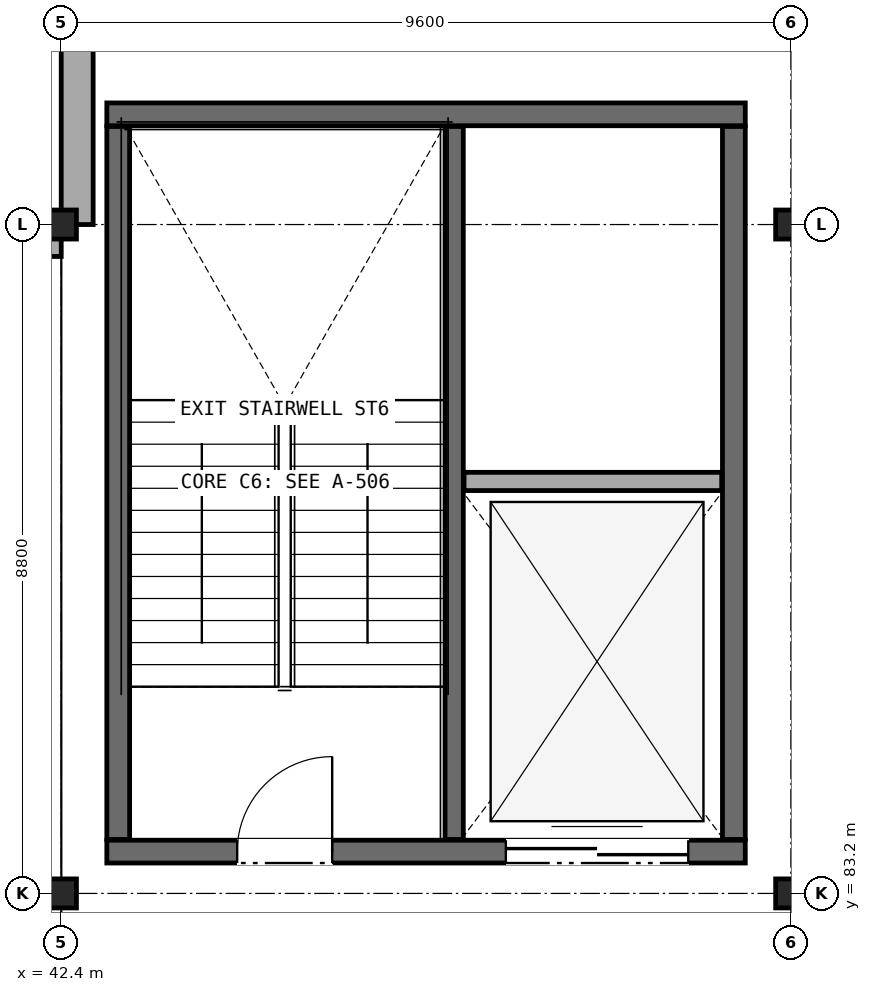
"""IFC4 building model, lengths in metres.
Left out: names, types, materials, properties, quantities, classifications, styles, units other than length and angle.
Written with IfcOpenShell. Run it as: python <this file> out.ifc"""

import sys

from ifc_helpers import new_model, si_unit, direction, frame, frame_2d, origin, origin_2d, place, context, subcontext, project, spatial, rectangle, i_section, extrude, element, fill, save


model = new_model("IFC4")
c1 = context("Model", 3, precision=1e-05, world=origin(), true_north=direction((0.0, 1.0)))
c2 = subcontext(c1, "Body", "Model", "MODEL_VIEW")
j1 = project(units=[si_unit("LENGTHUNIT", "METRE"), si_unit("PLANEANGLEUNIT", "RADIAN")], contexts=[c1])
p1 = place(None, origin())
s1 = spatial("IfcSite", under=j1, at=p1, CompositionType="ELEMENT")
p2 = place(p1, origin())
s2 = spatial("IfcBuilding", under=s1, at=p2, CompositionType="ELEMENT")
p3 = place(p2, frame((0.0, 0.0, 5.6)))
s3 = spatial("IfcBuildingStorey", under=s2, at=p3, CompositionType="ELEMENT", Elevation=5.6)
for number, where, z_axis, x_axis in (
    (1, (42.4, 83.2, 0.0), (0.0, 0.0, 1.0), (1.0, 0.0, 0.0)),
    (2, (42.4, 92.0, 0.0), (0.0, 0.0, 1.0), (1.0, 0.0, 0.0)),
    (3, (52.0, 83.2, 0.0), (0.0, 0.0, 1.0), (1.0, 0.0, 0.0)),
    (4, (52.0, 92.0, 0.0), (0.0, 0.0, 1.0), (1.0, 0.0, 0.0)),
):
    element("IfcColumn", number, at=place(p3, frame(where, z_axis=z_axis, x_axis=x_axis)), inside=s3, PredefinedType="COLUMN", context=c2, shape_type="SweptSolid", body=[
        extrude(i_section(OverallWidth=0.4, OverallDepth=0.382, WebThickness=0.025, FlangeThickness=0.036, at=origin_2d()), origin(), (0.0, 0.0, 1.0), 4.5),
    ])
p4 = place(p3, frame((42.61, 114.984, 0.0), z_axis=(0.0, 0.0, 1.0), x_axis=(0.0, -1.0, 0.0)))
e5 = element("IfcWall", 5, at=p4, inside=s3, PredefinedType="SOLIDWALL", context=c2, shape_type="SweptSolid", body=[
    extrude(rectangle(XDim=22.984, YDim=0.42, at=frame_2d((11.492, 0.0))), origin(), (0.0, 0.0, 1.0), 3.558),
])
p5 = place(p4, frame((1.8, 0.0, 0.75)))
e6 = element("IfcOpeningElement", 6, at=p5, cuts=e5, PredefinedType="OPENING", context=c2, shape_type="SweptSolid", body=[
    extrude(rectangle(XDim=1.4, YDim=2.5, at=frame_2d((0.7, 1.25))), frame((0.0, 0.22, 0.0), z_axis=(0.0, -1.0, 0.0), x_axis=(1.0, 0.0, 0.0)), (0.0, 0.0, 1.0), 0.44),
])
p6 = place(p4, frame((11.0, 0.0, 0.75)))
e7 = element("IfcOpeningElement", 7, at=p6, cuts=e5, PredefinedType="OPENING", context=c2, shape_type="SweptSolid", body=[
    extrude(rectangle(XDim=1.55, YDim=2.5, at=frame_2d((0.775, 1.25))), frame((0.0, 0.22, 0.0), z_axis=(0.0, -1.0, 0.0), x_axis=(1.0, 0.0, 0.0)), (0.0, 0.0, 1.0), 0.44),
])
p7 = place(p4, frame((15.6, 0.0, 0.75)))
e8 = element("IfcOpeningElement", 8, at=p7, cuts=e5, PredefinedType="OPENING", context=c2, shape_type="SweptSolid", body=[
    extrude(rectangle(XDim=1.7, YDim=2.5, at=frame_2d((0.85, 1.25))), frame((0.0, 0.22, 0.0), z_axis=(0.0, -1.0, 0.0), x_axis=(1.0, 0.0, 0.0)), (0.0, 0.0, 1.0), 0.44),
])
p8 = place(p3, frame((42.4, 91.79, 0.0), z_axis=(0.0, 0.0, 1.0), x_axis=(-1.0, 0.0, 0.0)))
e9 = element("IfcWall", 9, at=p8, inside=s3, PredefinedType="SOLIDWALL", context=c2, shape_type="SweptSolid", body=[
    extrude(rectangle(XDim=1.6, YDim=0.42, at=frame_2d((0.8, 0.0))), origin(), (0.0, 0.0, 1.0), 3.598),
])
p9 = place(p3, frame((43.0, 83.75, 0.0), z_axis=(0.0, 0.0, 1.0), x_axis=(1.0, 0.0, 0.0)))
e10 = element("IfcWall", 10, at=p9, inside=s3, PredefinedType="SHEAR", context=c2, shape_type="SweptSolid", body=[
    extrude(rectangle(XDim=8.4, YDim=0.3, at=frame_2d((4.2, 0.0))), origin(), (0.0, 0.0, 1.0), 4.175),
])
p10 = place(p9, frame((1.715, 0.0, 0.0)))
e11 = element("IfcOpeningElement", 11, at=p10, cuts=e10, PredefinedType="OPENING", context=c2, shape_type="SweptSolid", body=[
    extrude(rectangle(XDim=1.25, YDim=2.2, at=frame_2d((0.625, 1.1))), frame((0.0, 0.16, 0.0), z_axis=(0.0, -1.0, 0.0), x_axis=(1.0, 0.0, 0.0)), (0.0, 0.0, 1.0), 0.32),
])
p11 = place(p9, frame((5.25, 0.0, 0.0)))
e12 = element("IfcOpeningElement", 12, at=p11, cuts=e10, PredefinedType="OPENING", context=c2, shape_type="SweptSolid", body=[
    extrude(rectangle(XDim=2.4, YDim=2.55, at=frame_2d((1.2, 1.275))), frame((0.0, 0.16, 0.0), z_axis=(0.0, -1.0, 0.0), x_axis=(1.0, 0.0, 0.0)), (0.0, 0.0, 1.0), 0.32),
])
p12 = place(p3, frame((51.4, 93.45, 0.0), z_axis=(0.0, 0.0, 1.0), x_axis=(-1.0, 0.0, 0.0)))
e13 = element("IfcWall", 13, at=p12, inside=s3, PredefinedType="SHEAR", context=c2, shape_type="SweptSolid", body=[
    extrude(rectangle(XDim=8.4, YDim=0.3, at=frame_2d((4.2, 0.0))), origin(), (0.0, 0.0, 1.0), 4.175),
])
for number, where, z_axis, x_axis in (
    (14, (51.25, 83.91, 0.0), (0.0, 0.0, 1.0), (0.0, 1.0, 0.0)),
    (15, (43.15, 93.29, 0.0), (0.0, 0.0, 1.0), (0.0, -1.0, 0.0)),
):
    element("IfcWall", number, at=place(p3, frame(where, z_axis=z_axis, x_axis=x_axis)), inside=s3, PredefinedType="SHEAR", context=c2, shape_type="SweptSolid", body=[
        extrude(rectangle(XDim=9.38, YDim=0.3, at=frame_2d((4.69, 0.0))), origin(), (0.0, 0.0, 1.0), 4.175),
    ])
p13 = place(p3, frame((47.57, 83.91, 0.0), z_axis=(0.0, 0.0, 1.0), x_axis=(0.0, 1.0, 0.0)))
e16 = element("IfcWall", 16, at=p13, inside=s3, PredefinedType="SOLIDWALL", context=c2, shape_type="SweptSolid", body=[
    extrude(rectangle(XDim=9.38, YDim=0.24, at=frame_2d((4.69, 0.0))), origin(), (0.0, 0.0, 1.0), 4.175),
])
p14 = place(p3, frame((47.7, 88.62, 0.0), z_axis=(0.0, 0.0, 1.0), x_axis=(1.0, 0.0, 0.0)))
e17 = element("IfcWall", 17, at=p14, inside=s3, PredefinedType="SOLIDWALL", context=c2, shape_type="SweptSolid", body=[
    extrude(rectangle(XDim=3.39, YDim=0.24, at=frame_2d((1.695, 0.0))), origin(), (0.0, 0.0, 1.0), 4.175),
])
p15 = place(p10, origin())
e18 = element("IfcDoor", 18, at=p15, inside=s3, OperationType="SINGLE_SWING_RIGHT", PredefinedType="DOOR", context=c2, shape_type="SweptSolid", body=[
    extrude(rectangle(XDim=1.25, YDim=2.2, at=frame_2d((0.625, 1.1))), frame((0.0, 0.025, 0.0), z_axis=(0.0, -1.0, 0.0), x_axis=(1.0, 0.0, 0.0)), (0.0, 0.0, 1.0), 0.05),
])
fill(e11, e18)
p16 = place(p11, origin())
e19 = element("IfcDoor", 19, at=p16, inside=s3, OperationType="DOUBLE_DOOR_SLIDING", PredefinedType="DOOR", context=c2, shape_type="SweptSolid", body=[
    extrude(rectangle(XDim=2.4, YDim=2.55, at=frame_2d((1.2, 1.275))), frame((0.0, 0.025, 0.0), z_axis=(0.0, -1.0, 0.0), x_axis=(1.0, 0.0, 0.0)), (0.0, 0.0, 1.0), 0.05),
])
fill(e12, e19)
save(model, sys.argv[1])
